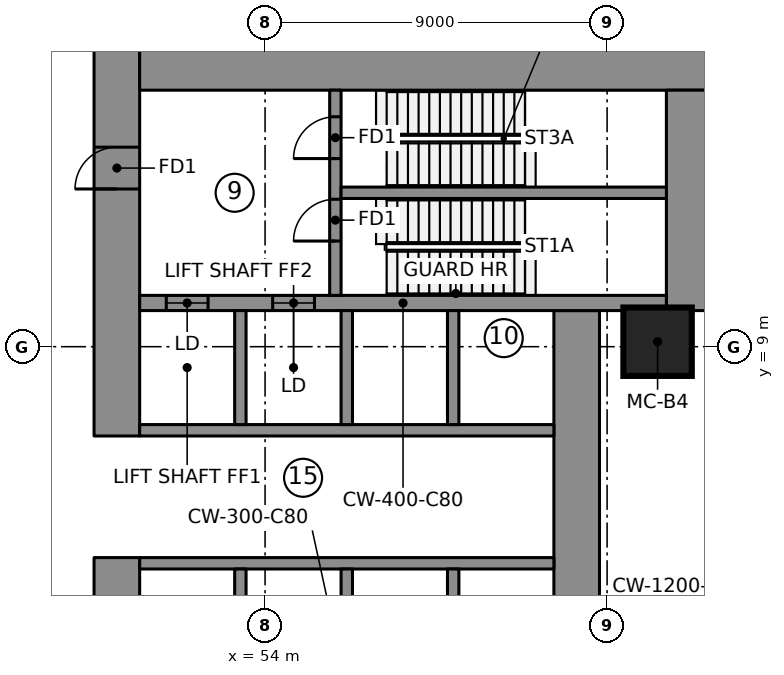
"""IFC4 building model, lengths in metres.
Left out: names, types, materials, properties, quantities, classifications, styles, units other than length and angle.
Written with IfcOpenShell. Run it as: python <this file> out.ifc"""

import sys

from ifc_helpers import new_model, si_unit, direction, frame, frame_2d, origin, origin_2d, place, context, subcontext, project, spatial, rectangle, extrude, element, fill, save


model = new_model("IFC4")
c1 = context("Model", 3, precision=1e-05, world=origin(), true_north=direction((0.0, 1.0)))
c2 = subcontext(c1, "Body", "Model", "MODEL_VIEW")
j1 = project(units=[si_unit("LENGTHUNIT", "METRE"), si_unit("PLANEANGLEUNIT", "RADIAN")], contexts=[c1])
p1 = place(None, origin())
s1 = spatial("IfcSite", under=j1, at=p1, CompositionType="ELEMENT")
p2 = place(p1, origin())
s2 = spatial("IfcBuilding", under=s1, at=p2, CompositionType="ELEMENT")
p3 = place(p2, frame((0.0, 0.0, -5.0)))
s3 = spatial("IfcBuildingStorey", under=s2, at=p3, CompositionType="ELEMENT", Elevation=-5.0)
p4 = place(p3, frame((50.1, 6.65, 0.0), z_axis=(0.0, 0.0, 1.0), x_axis=(0.0, 1.0, 0.0)))
e1 = element("IfcWall", 1, at=p4, inside=s3, PredefinedType="SHEAR", context=c2, shape_type="SweptSolid", body=[
    extrude(rectangle(XDim=10.3, YDim=1.2, at=frame_2d((5.15, 0.0))), origin(), (0.0, 0.0, 1.0), 5.0),
])
p5 = place(p4, frame((6.5, 0.0, 0.0)))
e2 = element("IfcOpeningElement", 2, at=p5, cuts=e1, PredefinedType="OPENING", context=c2, shape_type="SweptSolid", body=[
    extrude(rectangle(XDim=1.1, YDim=2.1, at=frame_2d((0.55, 1.05))), frame((0.0, 0.61, 0.0), z_axis=(0.0, -1.0, 0.0), x_axis=(1.0, 0.0, 0.0)), (0.0, 0.0, 1.0), 1.22),
])
p6 = place(p3, frame((50.1, -3.45, 0.0), z_axis=(0.0, 0.0, 1.0), x_axis=(0.0, 1.0, 0.0)))
e3 = element("IfcWall", 3, at=p6, inside=s3, PredefinedType="SHEAR", context=c2, shape_type="SweptSolid", body=[
    extrude(rectangle(XDim=6.9, YDim=1.2, at=frame_2d((3.45, 0.0))), origin(), (0.0, 0.0, 1.0), 5.0),
])
p7 = place(p3, frame((50.7, 16.35, 0.0), z_axis=(0.0, 0.0, 1.0), x_axis=(1.0, 0.0, 0.0)))
e4 = element("IfcWall", 4, at=p7, inside=s3, PredefinedType="SHEAR", context=c2, shape_type="SweptSolid", body=[
    extrude(rectangle(XDim=15.06, YDim=1.2, at=frame_2d((7.53, 0.0))), origin(), (0.0, 0.0, 1.0), 5.0),
])
p8 = place(p3, frame((65.16, 9.95, 0.0), z_axis=(0.0, 0.0, 1.0), x_axis=(0.0, 1.0, 0.0)))
e5 = element("IfcWall", 5, at=p8, inside=s3, PredefinedType="SHEAR", context=c2, shape_type="SweptSolid", body=[
    extrude(rectangle(XDim=5.8, YDim=1.2, at=frame_2d((2.9, 0.0))), origin(), (0.0, 0.0, 1.0), 5.0),
])
p9 = place(p3, frame((62.2, -9.95, 0.0), z_axis=(0.0, 0.0, 1.0), x_axis=(0.0, 1.0, 0.0)))
e6 = element("IfcWall", 6, at=p9, inside=s3, PredefinedType="SHEAR", context=c2, shape_type="SweptSolid", body=[
    extrude(rectangle(XDim=19.9, YDim=1.2, at=frame_2d((9.95, 0.0))), origin(), (0.0, 0.0, 1.0), 5.0),
])
p10 = place(p3, frame((50.7, 10.15, 0.0), z_axis=(0.0, 0.0, 1.0), x_axis=(1.0, 0.0, 0.0)))
e7 = element("IfcWall", 7, at=p10, inside=s3, PredefinedType="SHEAR", context=c2, shape_type="SweptSolid", body=[
    extrude(rectangle(XDim=13.86, YDim=0.4, at=frame_2d((6.93, 0.0))), origin(), (0.0, 0.0, 1.0), 5.0),
])
p11 = place(p10, frame((0.7, 0.0, 0.0)))
e8 = element("IfcOpeningElement", 8, at=p11, cuts=e7, PredefinedType="OPENING", context=c2, shape_type="SweptSolid", body=[
    extrude(rectangle(XDim=1.1, YDim=2.1, at=frame_2d((0.55, 1.05))), frame((0.0, 0.21, 0.0), z_axis=(0.0, -1.0, 0.0), x_axis=(1.0, 0.0, 0.0)), (0.0, 0.0, 1.0), 0.42),
])
p12 = place(p10, frame((3.5, 0.0, 0.0)))
e9 = element("IfcOpeningElement", 9, at=p12, cuts=e7, PredefinedType="OPENING", context=c2, shape_type="SweptSolid", body=[
    extrude(rectangle(XDim=1.1, YDim=2.1, at=frame_2d((0.55, 1.05))), frame((0.0, 0.21, 0.0), z_axis=(0.0, -1.0, 0.0), x_axis=(1.0, 0.0, 0.0)), (0.0, 0.0, 1.0), 0.42),
])
for number, where, z_axis, x_axis in (
    (10, (50.7, 3.3, 0.0), (0.0, 0.0, 1.0), (1.0, 0.0, 0.0)),
    (11, (50.7, 6.8, 0.0), (0.0, 0.0, 1.0), (1.0, 0.0, 0.0)),
):
    element("IfcWall", number, at=place(p3, frame(where, z_axis=z_axis, x_axis=x_axis)), inside=s3, PredefinedType="SHEAR", context=c2, shape_type="SweptSolid", body=[
        extrude(rectangle(XDim=10.9, YDim=0.3, at=frame_2d((5.45, 0.0))), origin(), (0.0, 0.0, 1.0), 5.0),
    ])
for number, where, z_axis, x_axis in (
    (12, (53.35, 0.15, 0.0), (0.0, 0.0, 1.0), (0.0, 1.0, 0.0)),
    (13, (53.35, 6.95, 0.0), (0.0, 0.0, 1.0), (0.0, 1.0, 0.0)),
    (14, (56.15, 0.15, 0.0), (0.0, 0.0, 1.0), (0.0, 1.0, 0.0)),
    (15, (56.15, 6.95, 0.0), (0.0, 0.0, 1.0), (0.0, 1.0, 0.0)),
    (16, (58.95, 0.15, 0.0), (0.0, 0.0, 1.0), (0.0, 1.0, 0.0)),
    (17, (58.95, 6.95, 0.0), (0.0, 0.0, 1.0), (0.0, 1.0, 0.0)),
):
    element("IfcWall", number, at=place(p3, frame(where, z_axis=z_axis, x_axis=x_axis)), inside=s3, PredefinedType="SHEAR", context=c2, shape_type="SweptSolid", body=[
        extrude(rectangle(XDim=3.0, YDim=0.3, at=frame_2d((1.5, 0.0))), origin(), (0.0, 0.0, 1.0), 5.0),
    ])
p13 = place(p3, frame((55.85, 10.35, 0.0), z_axis=(0.0, 0.0, 1.0), x_axis=(0.0, 1.0, 0.0)))
e18 = element("IfcWall", 18, at=p13, inside=s3, PredefinedType="SHEAR", context=c2, shape_type="SweptSolid", body=[
    extrude(rectangle(XDim=5.4, YDim=0.3, at=frame_2d((2.7, 0.0))), origin(), (0.0, 0.0, 1.0), 5.0),
])
p14 = place(p13, frame((1.43, 0.0, 0.0)))
e19 = element("IfcOpeningElement", 19, at=p14, cuts=e18, PredefinedType="OPENING", context=c2, shape_type="SweptSolid", body=[
    extrude(rectangle(XDim=1.1, YDim=2.1, at=frame_2d((0.55, 1.05))), frame((0.0, 0.16, 0.0), z_axis=(0.0, -1.0, 0.0), x_axis=(1.0, 0.0, 0.0)), (0.0, 0.0, 1.0), 0.32),
])
p15 = place(p13, frame((3.6, 0.0, 0.0)))
e20 = element("IfcOpeningElement", 20, at=p15, cuts=e18, PredefinedType="OPENING", context=c2, shape_type="SweptSolid", body=[
    extrude(rectangle(XDim=1.1, YDim=2.1, at=frame_2d((0.55, 1.05))), frame((0.0, 0.16, 0.0), z_axis=(0.0, -1.0, 0.0), x_axis=(1.0, 0.0, 0.0)), (0.0, 0.0, 1.0), 0.32),
])
p16 = place(p3, frame((56.0, 13.05, 0.0), z_axis=(0.0, 0.0, 1.0), x_axis=(1.0, 0.0, 0.0)))
e21 = element("IfcWall", 21, at=p16, inside=s3, PredefinedType="SHEAR", context=c2, shape_type="SweptSolid", body=[
    extrude(rectangle(XDim=8.56, YDim=0.3, at=frame_2d((4.28, 0.0))), origin(), (0.0, 0.0, 1.0), 5.0),
])
p17 = place(p3, frame((64.328, 9.131, 0.0), z_axis=(0.0, 0.0, 1.0), x_axis=(1.0, 0.0, 0.0)))
e22 = element("IfcColumn", 22, at=p17, inside=s3, PredefinedType="COLUMN", context=c2, shape_type="SweptSolid", body=[
    extrude(rectangle(XDim=1.8, YDim=1.8, at=origin_2d()), origin(), (0.0, 0.0, 1.0), 5.0),
])
p18 = place(p11, origin())
e23 = element("IfcDoor", 23, at=p18, inside=s3, OperationType="DOUBLE_DOOR_SLIDING", PredefinedType="DOOR", context=c2, shape_type="SweptSolid", body=[
    extrude(rectangle(XDim=1.1, YDim=2.1, at=frame_2d((0.55, 1.05))), frame((0.0, 0.025, 0.0), z_axis=(0.0, -1.0, 0.0), x_axis=(1.0, 0.0, 0.0)), (0.0, 0.0, 1.0), 0.05),
])
fill(e8, e23)
p19 = place(p12, origin())
e24 = element("IfcDoor", 24, at=p19, inside=s3, OperationType="DOUBLE_DOOR_SLIDING", PredefinedType="DOOR", context=c2, shape_type="SweptSolid", body=[
    extrude(rectangle(XDim=1.1, YDim=2.1, at=frame_2d((0.55, 1.05))), frame((0.0, 0.025, 0.0), z_axis=(0.0, -1.0, 0.0), x_axis=(1.0, 0.0, 0.0)), (0.0, 0.0, 1.0), 0.05),
])
fill(e9, e24)
p20 = place(p14, origin())
e25 = element("IfcDoor", 25, at=p20, inside=s3, OperationType="SINGLE_SWING_RIGHT", PredefinedType="DOOR", context=c2, shape_type="SweptSolid", body=[
    extrude(rectangle(XDim=1.1, YDim=2.1, at=frame_2d((0.55, 1.05))), frame((0.0, 0.025, 0.0), z_axis=(0.0, -1.0, 0.0), x_axis=(1.0, 0.0, 0.0)), (0.0, 0.0, 1.0), 0.05),
])
fill(e19, e25)
p21 = place(p15, origin())
e26 = element("IfcDoor", 26, at=p21, inside=s3, OperationType="SINGLE_SWING_RIGHT", PredefinedType="DOOR", context=c2, shape_type="SweptSolid", body=[
    extrude(rectangle(XDim=1.1, YDim=2.1, at=frame_2d((0.55, 1.05))), frame((0.0, 0.025, 0.0), z_axis=(0.0, -1.0, 0.0), x_axis=(1.0, 0.0, 0.0)), (0.0, 0.0, 1.0), 0.05),
])
fill(e20, e26)
p22 = place(p5, origin())
e27 = element("IfcDoor", 27, at=p22, inside=s3, OperationType="SINGLE_SWING_RIGHT", PredefinedType="DOOR", context=c2, shape_type="SweptSolid", body=[
    extrude(rectangle(XDim=1.1, YDim=2.1, at=frame_2d((0.55, 1.05))), frame((0.0, 0.025, 0.0), z_axis=(0.0, -1.0, 0.0), x_axis=(1.0, 0.0, 0.0)), (0.0, 0.0, 1.0), 0.05),
])
fill(e2, e27)
save(model, sys.argv[1])
